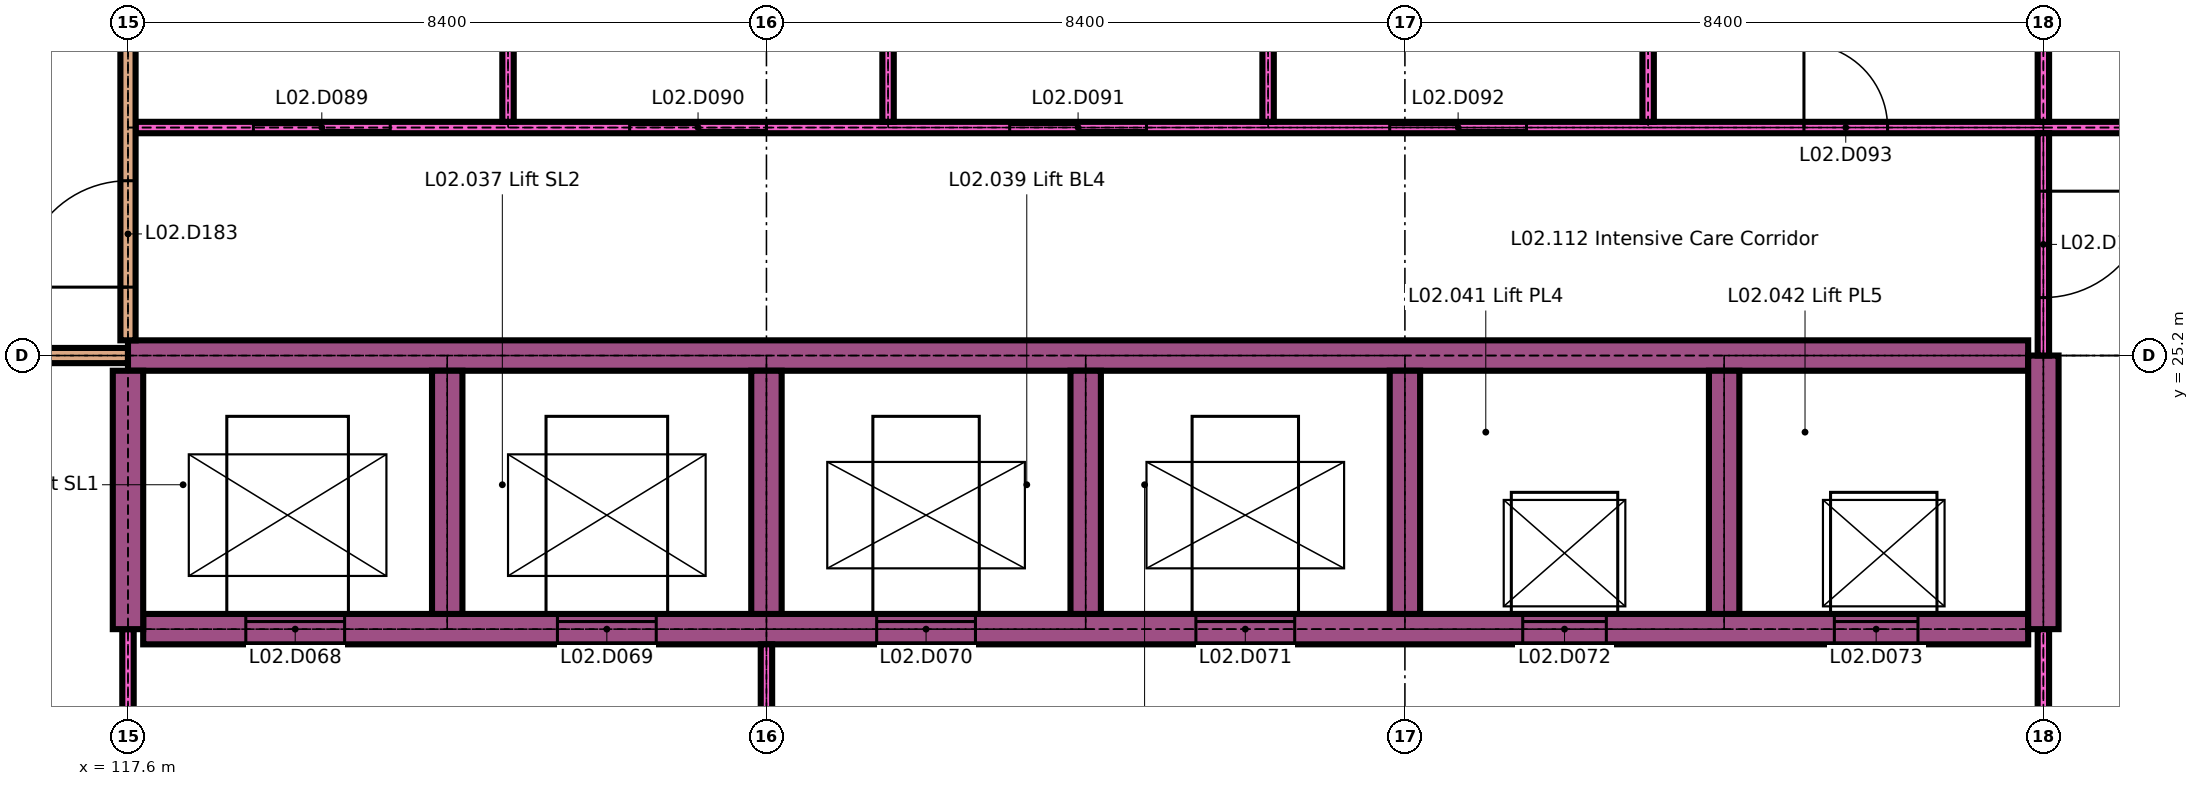
"""IFC4 building model, lengths in metres.
Left out: names, types, materials, properties, quantities, classifications, styles, units other than length and angle.
Written with IfcOpenShell. Run it as: python <this file> out.ifc"""

import sys

from ifc_helpers import new_model, si_unit, direction, frame, frame_2d, origin, place, context, subcontext, project, spatial, rectangle, extrude, element, fill, save


model = new_model("IFC4")
c1 = context("Model", 3, precision=1e-05, world=origin(), true_north=direction((0.0, 1.0)))
c2 = subcontext(c1, "Body", "Model", "MODEL_VIEW")
j1 = project(units=[si_unit("LENGTHUNIT", "METRE"), si_unit("PLANEANGLEUNIT", "RADIAN")], contexts=[c1])
p1 = place(None, origin())
s1 = spatial("IfcSite", under=j1, at=p1, CompositionType="ELEMENT")
p2 = place(p1, origin())
s2 = spatial("IfcBuilding", under=s1, at=p2, CompositionType="ELEMENT")
p3 = place(p2, frame((0.0, 0.0, 8.4)))
s3 = spatial("IfcBuildingStorey", under=s2, at=p3, CompositionType="ELEMENT", Elevation=8.4)
p4 = place(p3, frame((117.8, 21.6, 0.0), z_axis=(0.0, 0.0, 1.0), x_axis=(1.0, 0.0, 0.0)))
e1 = element("IfcWall", 1, at=p4, inside=s3, PredefinedType="SHEAR", context=c2, shape_type="SweptSolid", body=[
    extrude(rectangle(XDim=24.8, YDim=0.4, at=frame_2d((12.4, 0.0))), origin(), (0.0, 0.0, 1.0), 4.2),
])
p5 = place(p4, frame((1.35, 0.0, 0.0)))
e2 = element("IfcOpeningElement", 2, at=p5, cuts=e1, PredefinedType="OPENING", context=c2, shape_type="SweptSolid", body=[
    extrude(rectangle(XDim=1.3, YDim=2.1, at=frame_2d((0.65, 1.05))), frame((0.0, 0.21, 0.0), z_axis=(0.0, -1.0, 0.0), x_axis=(1.0, 0.0, 0.0)), (0.0, 0.0, 1.0), 0.42),
])
p6 = place(p4, frame((5.45, 0.0, 0.0)))
e3 = element("IfcOpeningElement", 3, at=p6, cuts=e1, PredefinedType="OPENING", context=c2, shape_type="SweptSolid", body=[
    extrude(rectangle(XDim=1.3, YDim=2.1, at=frame_2d((0.65, 1.05))), frame((0.0, 0.21, 0.0), z_axis=(0.0, -1.0, 0.0), x_axis=(1.0, 0.0, 0.0)), (0.0, 0.0, 1.0), 0.42),
])
p7 = place(p4, frame((9.65, 0.0, 0.0)))
e4 = element("IfcOpeningElement", 4, at=p7, cuts=e1, PredefinedType="OPENING", context=c2, shape_type="SweptSolid", body=[
    extrude(rectangle(XDim=1.3, YDim=2.1, at=frame_2d((0.65, 1.05))), frame((0.0, 0.21, 0.0), z_axis=(0.0, -1.0, 0.0), x_axis=(1.0, 0.0, 0.0)), (0.0, 0.0, 1.0), 0.42),
])
p8 = place(p4, frame((13.85, 0.0, 0.0)))
e5 = element("IfcOpeningElement", 5, at=p8, cuts=e1, PredefinedType="OPENING", context=c2, shape_type="SweptSolid", body=[
    extrude(rectangle(XDim=1.3, YDim=2.1, at=frame_2d((0.65, 1.05))), frame((0.0, 0.21, 0.0), z_axis=(0.0, -1.0, 0.0), x_axis=(1.0, 0.0, 0.0)), (0.0, 0.0, 1.0), 0.42),
])
p9 = place(p4, frame((18.15, 0.0, 0.0)))
e6 = element("IfcOpeningElement", 6, at=p9, cuts=e1, PredefinedType="OPENING", context=c2, shape_type="SweptSolid", body=[
    extrude(rectangle(XDim=1.1, YDim=2.1, at=frame_2d((0.55, 1.05))), frame((0.0, 0.21, 0.0), z_axis=(0.0, -1.0, 0.0), x_axis=(1.0, 0.0, 0.0)), (0.0, 0.0, 1.0), 0.42),
])
p10 = place(p4, frame((22.25, 0.0, 0.0)))
e7 = element("IfcOpeningElement", 7, at=p10, cuts=e1, PredefinedType="OPENING", context=c2, shape_type="SweptSolid", body=[
    extrude(rectangle(XDim=1.1, YDim=2.1, at=frame_2d((0.55, 1.05))), frame((0.0, 0.21, 0.0), z_axis=(0.0, -1.0, 0.0), x_axis=(1.0, 0.0, 0.0)), (0.0, 0.0, 1.0), 0.42),
])
p11 = place(p3, frame((109.2, 25.2, 0.0), z_axis=(0.0, 0.0, 1.0), x_axis=(1.0, 0.0, 0.0)))
e8 = element("IfcWall", 8, at=p11, inside=s3, PredefinedType="PARTITIONING", context=c2, shape_type="SweptSolid", body=[
    extrude(rectangle(XDim=8.4, YDim=0.2, at=frame_2d((4.2, 0.0))), origin(), (0.0, 0.0, 1.0), 4.2),
])
p12 = place(p11, frame((3.5, 0.0, 0.0)))
e9 = element("IfcOpeningElement", 9, at=p12, cuts=e8, PredefinedType="OPENING", context=c2, shape_type="SweptSolid", body=[
    extrude(rectangle(XDim=1.4, YDim=2.1, at=frame_2d((0.7, 1.05))), frame((0.0, 0.11, 0.0), z_axis=(0.0, -1.0, 0.0), x_axis=(1.0, 0.0, 0.0)), (0.0, 0.0, 1.0), 0.22),
])
p13 = place(p3, frame((117.6, 25.2, 0.0), z_axis=(0.0, 0.0, 1.0), x_axis=(1.0, 0.0, 0.0)))
e10 = element("IfcWall", 10, at=p13, inside=s3, PredefinedType="SHEAR", context=c2, shape_type="SweptSolid", body=[
    extrude(rectangle(XDim=25.0, YDim=0.4, at=frame_2d((12.5, 0.0))), origin(), (0.0, 0.0, 1.0), 4.2),
])
p14 = place(p3, frame((117.7, 28.2, 0.0), z_axis=(0.0, 0.0, 1.0), x_axis=(1.0, 0.0, 0.0)))
e11 = element("IfcWall", 11, at=p14, inside=s3, PredefinedType="PARTITIONING", context=c2, shape_type="SweptSolid", body=[
    extrude(rectangle(XDim=50.15, YDim=0.15, at=frame_2d((25.075, 0.0))), origin(), (0.0, 0.0, 1.0), 4.2),
])
p15 = place(p14, frame((1.55, 0.0, 0.0)))
e12 = element("IfcOpeningElement", 12, at=p15, cuts=e11, PredefinedType="OPENING", context=c2, shape_type="SweptSolid", body=[
    extrude(rectangle(XDim=1.8, YDim=2.4, at=frame_2d((0.9, 1.2))), frame((0.0, 0.085, 0.0), z_axis=(0.0, -1.0, 0.0), x_axis=(1.0, 0.0, 0.0)), (0.0, 0.0, 1.0), 0.17),
])
p16 = place(p14, frame((6.5, 0.0, 0.0)))
e13 = element("IfcOpeningElement", 13, at=p16, cuts=e11, PredefinedType="OPENING", context=c2, shape_type="SweptSolid", body=[
    extrude(rectangle(XDim=1.8, YDim=2.4, at=frame_2d((0.9, 1.2))), frame((0.0, 0.085, 0.0), z_axis=(0.0, -1.0, 0.0), x_axis=(1.0, 0.0, 0.0)), (0.0, 0.0, 1.0), 0.17),
])
p17 = place(p14, frame((11.5, 0.0, 0.0)))
e14 = element("IfcOpeningElement", 14, at=p17, cuts=e11, PredefinedType="OPENING", context=c2, shape_type="SweptSolid", body=[
    extrude(rectangle(XDim=1.8, YDim=2.4, at=frame_2d((0.9, 1.2))), frame((0.0, 0.085, 0.0), z_axis=(0.0, -1.0, 0.0), x_axis=(1.0, 0.0, 0.0)), (0.0, 0.0, 1.0), 0.17),
])
p18 = place(p14, frame((16.5, 0.0, 0.0)))
e15 = element("IfcOpeningElement", 15, at=p18, cuts=e11, PredefinedType="OPENING", context=c2, shape_type="SweptSolid", body=[
    extrude(rectangle(XDim=1.8, YDim=2.4, at=frame_2d((0.9, 1.2))), frame((0.0, 0.085, 0.0), z_axis=(0.0, -1.0, 0.0), x_axis=(1.0, 0.0, 0.0)), (0.0, 0.0, 1.0), 0.17),
])
p19 = place(p14, frame((21.95, 0.0, 0.0)))
e16 = element("IfcOpeningElement", 16, at=p19, cuts=e11, PredefinedType="OPENING", context=c2, shape_type="SweptSolid", body=[
    extrude(rectangle(XDim=1.1, YDim=2.1, at=frame_2d((0.55, 1.05))), frame((0.0, 0.085, 0.0), z_axis=(0.0, -1.0, 0.0), x_axis=(1.0, 0.0, 0.0)), (0.0, 0.0, 1.0), 0.17),
])
p20 = place(p14, frame((26.7, 0.0, 0.0)))
e17 = element("IfcOpeningElement", 17, at=p20, cuts=e11, PredefinedType="OPENING", context=c2, shape_type="SweptSolid", body=[
    extrude(rectangle(XDim=1.8, YDim=2.4, at=frame_2d((0.9, 1.2))), frame((0.0, 0.085, 0.0), z_axis=(0.0, -1.0, 0.0), x_axis=(1.0, 0.0, 0.0)), (0.0, 0.0, 1.0), 0.17),
])
p21 = place(p14, frame((31.7, 0.0, 0.0)))
e18 = element("IfcOpeningElement", 18, at=p21, cuts=e11, PredefinedType="OPENING", context=c2, shape_type="SweptSolid", body=[
    extrude(rectangle(XDim=1.8, YDim=2.4, at=frame_2d((0.9, 1.2))), frame((0.0, 0.085, 0.0), z_axis=(0.0, -1.0, 0.0), x_axis=(1.0, 0.0, 0.0)), (0.0, 0.0, 1.0), 0.17),
])
p22 = place(p14, frame((36.7, 0.0, 0.0)))
e19 = element("IfcOpeningElement", 19, at=p22, cuts=e11, PredefinedType="OPENING", context=c2, shape_type="SweptSolid", body=[
    extrude(rectangle(XDim=1.8, YDim=2.4, at=frame_2d((0.9, 1.2))), frame((0.0, 0.085, 0.0), z_axis=(0.0, -1.0, 0.0), x_axis=(1.0, 0.0, 0.0)), (0.0, 0.0, 1.0), 0.17),
])
p23 = place(p14, frame((41.7, 0.0, 0.0)))
e20 = element("IfcOpeningElement", 20, at=p23, cuts=e11, PredefinedType="OPENING", context=c2, shape_type="SweptSolid", body=[
    extrude(rectangle(XDim=1.8, YDim=2.4, at=frame_2d((0.9, 1.2))), frame((0.0, 0.085, 0.0), z_axis=(0.0, -1.0, 0.0), x_axis=(1.0, 0.0, 0.0)), (0.0, 0.0, 1.0), 0.17),
])
p24 = place(p14, frame((46.725, 0.0, 0.0)))
e21 = element("IfcOpeningElement", 21, at=p24, cuts=e11, PredefinedType="OPENING", context=c2, shape_type="SweptSolid", body=[
    extrude(rectangle(XDim=1.8, YDim=2.4, at=frame_2d((0.9, 1.2))), frame((0.0, 0.085, 0.0), z_axis=(0.0, -1.0, 0.0), x_axis=(1.0, 0.0, 0.0)), (0.0, 0.0, 1.0), 0.17),
])
p25 = place(p3, frame((117.6, 16.8, 0.0), z_axis=(0.0, 0.0, 1.0), x_axis=(0.0, 1.0, 0.0)))
e22 = element("IfcWall", 22, at=p25, inside=s3, PredefinedType="PARTITIONING", context=c2, shape_type="SweptSolid", body=[
    extrude(rectangle(XDim=4.8, YDim=0.15, at=frame_2d((2.4, 0.0))), origin(), (0.0, 0.0, 1.0), 4.2),
])
p26 = place(p3, frame((117.6, 21.6, 0.0), z_axis=(0.0, 0.0, 1.0), x_axis=(0.0, 1.0, 0.0)))
e23 = element("IfcWall", 23, at=p26, inside=s3, PredefinedType="SHEAR", context=c2, shape_type="SweptSolid", body=[
    extrude(rectangle(XDim=3.4, YDim=0.4, at=frame_2d((1.7, 0.0))), origin(), (0.0, 0.0, 1.0), 4.2),
])
p27 = place(p3, frame((117.6, 25.4, 0.0), z_axis=(0.0, 0.0, 1.0), x_axis=(0.0, 1.0, 0.0)))
e24 = element("IfcWall", 24, at=p27, inside=s3, PredefinedType="PARTITIONING", context=c2, shape_type="SweptSolid", body=[
    extrude(rectangle(XDim=4.6, YDim=0.2, at=frame_2d((2.3, 0.0))), origin(), (0.0, 0.0, 1.0), 4.2),
])
p28 = place(p27, frame((0.7, 0.0, 0.0)))
e25 = element("IfcOpeningElement", 25, at=p28, cuts=e24, PredefinedType="OPENING", context=c2, shape_type="SweptSolid", body=[
    extrude(rectangle(XDim=1.4, YDim=2.1, at=frame_2d((0.7, 1.05))), frame((0.0, 0.11, 0.0), z_axis=(0.0, -1.0, 0.0), x_axis=(1.0, 0.0, 0.0)), (0.0, 0.0, 1.0), 0.22),
])
p29 = place(p3, frame((121.8, 21.8, 0.0), z_axis=(0.0, 0.0, 1.0), x_axis=(0.0, 1.0, 0.0)))
e26 = element("IfcWall", 26, at=p29, inside=s3, PredefinedType="SHEAR", context=c2, shape_type="SweptSolid", body=[
    extrude(rectangle(XDim=3.2, YDim=0.4, at=frame_2d((1.6, 0.0))), origin(), (0.0, 0.0, 1.0), 4.2),
])
p30 = place(p3, frame((122.6, 28.275, 0.0), z_axis=(0.0, 0.0, 1.0), x_axis=(0.0, 1.0, 0.0)))
e27 = element("IfcWall", 27, at=p30, inside=s3, PredefinedType="PARTITIONING", context=c2, shape_type="SweptSolid", body=[
    extrude(rectangle(XDim=5.175, YDim=0.15, at=frame_2d((2.587, 0.0))), origin(), (0.0, 0.0, 1.0), 4.2),
])
p31 = place(p3, frame((126.0, 16.8, 0.0), z_axis=(0.0, 0.0, 1.0), x_axis=(0.0, 1.0, 0.0)))
e28 = element("IfcWall", 28, at=p31, inside=s3, PredefinedType="PARTITIONING", context=c2, shape_type="SweptSolid", body=[
    extrude(rectangle(XDim=4.6, YDim=0.15, at=frame_2d((2.3, 0.0))), origin(), (0.0, 0.0, 1.0), 4.2),
])
p32 = place(p3, frame((126.0, 21.8, 0.0), z_axis=(0.0, 0.0, 1.0), x_axis=(0.0, 1.0, 0.0)))
e29 = element("IfcWall", 29, at=p32, inside=s3, PredefinedType="SHEAR", context=c2, shape_type="SweptSolid", body=[
    extrude(rectangle(XDim=3.2, YDim=0.4, at=frame_2d((1.6, 0.0))), origin(), (0.0, 0.0, 1.0), 4.2),
])
p33 = place(p3, frame((127.6, 28.275, 0.0), z_axis=(0.0, 0.0, 1.0), x_axis=(0.0, 1.0, 0.0)))
e30 = element("IfcWall", 30, at=p33, inside=s3, PredefinedType="PARTITIONING", context=c2, shape_type="SweptSolid", body=[
    extrude(rectangle(XDim=5.175, YDim=0.15, at=frame_2d((2.587, 0.0))), origin(), (0.0, 0.0, 1.0), 4.2),
])
p34 = place(p3, frame((130.2, 21.8, 0.0), z_axis=(0.0, 0.0, 1.0), x_axis=(0.0, 1.0, 0.0)))
e31 = element("IfcWall", 31, at=p34, inside=s3, PredefinedType="SHEAR", context=c2, shape_type="SweptSolid", body=[
    extrude(rectangle(XDim=3.2, YDim=0.4, at=frame_2d((1.6, 0.0))), origin(), (0.0, 0.0, 1.0), 4.2),
])
p35 = place(p3, frame((132.6, 28.275, 0.0), z_axis=(0.0, 0.0, 1.0), x_axis=(0.0, 1.0, 0.0)))
e32 = element("IfcWall", 32, at=p35, inside=s3, PredefinedType="PARTITIONING", context=c2, shape_type="SweptSolid", body=[
    extrude(rectangle(XDim=5.175, YDim=0.15, at=frame_2d((2.587, 0.0))), origin(), (0.0, 0.0, 1.0), 4.2),
])
p36 = place(p3, frame((134.4, 21.8, 0.0), z_axis=(0.0, 0.0, 1.0), x_axis=(0.0, 1.0, 0.0)))
e33 = element("IfcWall", 33, at=p36, inside=s3, PredefinedType="SHEAR", context=c2, shape_type="SweptSolid", body=[
    extrude(rectangle(XDim=3.2, YDim=0.4, at=frame_2d((1.6, 0.0))), origin(), (0.0, 0.0, 1.0), 4.2),
])
p37 = place(p3, frame((137.6, 28.275, 0.0), z_axis=(0.0, 0.0, 1.0), x_axis=(0.0, 1.0, 0.0)))
e34 = element("IfcWall", 34, at=p37, inside=s3, PredefinedType="PARTITIONING", context=c2, shape_type="SweptSolid", body=[
    extrude(rectangle(XDim=5.175, YDim=0.15, at=frame_2d((2.587, 0.0))), origin(), (0.0, 0.0, 1.0), 4.2),
])
p38 = place(p3, frame((138.6, 21.8, 0.0), z_axis=(0.0, 0.0, 1.0), x_axis=(0.0, 1.0, 0.0)))
e35 = element("IfcWall", 35, at=p38, inside=s3, PredefinedType="SHEAR", context=c2, shape_type="SweptSolid", body=[
    extrude(rectangle(XDim=3.2, YDim=0.4, at=frame_2d((1.6, 0.0))), origin(), (0.0, 0.0, 1.0), 4.2),
])
p39 = place(p3, frame((142.8, 16.875, 0.0), z_axis=(0.0, 0.0, 1.0), x_axis=(0.0, 1.0, 0.0)))
e36 = element("IfcWall", 36, at=p39, inside=s3, PredefinedType="PARTITIONING", context=c2, shape_type="SweptSolid", body=[
    extrude(rectangle(XDim=4.725, YDim=0.15, at=frame_2d((2.363, 0.0))), origin(), (0.0, 0.0, 1.0), 4.2),
])
p40 = place(p3, frame((142.8, 21.6, 0.0), z_axis=(0.0, 0.0, 1.0), x_axis=(0.0, 1.0, 0.0)))
e37 = element("IfcWall", 37, at=p40, inside=s3, PredefinedType="SHEAR", context=c2, shape_type="SweptSolid", body=[
    extrude(rectangle(XDim=3.6, YDim=0.4, at=frame_2d((1.8, 0.0))), origin(), (0.0, 0.0, 1.0), 4.2),
])
p41 = place(p3, frame((142.8, 25.2, 0.0), z_axis=(0.0, 0.0, 1.0), x_axis=(0.0, 1.0, 0.0)))
e38 = element("IfcWall", 38, at=p41, inside=s3, PredefinedType="PARTITIONING", context=c2, shape_type="SweptSolid", body=[
    extrude(rectangle(XDim=2.925, YDim=0.15, at=frame_2d((1.462, 0.0))), origin(), (0.0, 0.0, 1.0), 4.2),
])
p42 = place(p41, frame((0.762, 0.0, 0.0)))
e39 = element("IfcOpeningElement", 39, at=p42, cuts=e38, PredefinedType="OPENING", context=c2, shape_type="SweptSolid", body=[
    extrude(rectangle(XDim=1.4, YDim=2.1, at=frame_2d((0.7, 1.05))), frame((0.0, 0.085, 0.0), z_axis=(0.0, -1.0, 0.0), x_axis=(1.0, 0.0, 0.0)), (0.0, 0.0, 1.0), 0.17),
])
p43 = place(p3, frame((142.8, 28.275, 0.0), z_axis=(0.0, 0.0, 1.0), x_axis=(0.0, 1.0, 0.0)))
e40 = element("IfcWall", 40, at=p43, inside=s3, PredefinedType="PARTITIONING", context=c2, shape_type="SweptSolid", body=[
    extrude(rectangle(XDim=4.9, YDim=0.15, at=frame_2d((2.45, 0.0))), origin(), (0.0, 0.0, 1.0), 4.2),
])
p44 = place(p5, origin())
e41 = element("IfcDoor", 41, at=p44, inside=s3, OperationType="SLIDING_TO_LEFT", PredefinedType="DOOR", context=c2, shape_type="SweptSolid", body=[
    extrude(rectangle(XDim=1.3, YDim=2.1, at=frame_2d((0.65, 1.05))), frame((0.0, 0.025, 0.0), z_axis=(0.0, -1.0, 0.0), x_axis=(1.0, 0.0, 0.0)), (0.0, 0.0, 1.0), 0.05),
])
fill(e2, e41)
p45 = place(p6, origin())
e42 = element("IfcDoor", 42, at=p45, inside=s3, OperationType="SLIDING_TO_LEFT", PredefinedType="DOOR", context=c2, shape_type="SweptSolid", body=[
    extrude(rectangle(XDim=1.3, YDim=2.1, at=frame_2d((0.65, 1.05))), frame((0.0, 0.025, 0.0), z_axis=(0.0, -1.0, 0.0), x_axis=(1.0, 0.0, 0.0)), (0.0, 0.0, 1.0), 0.05),
])
fill(e3, e42)
p46 = place(p7, origin())
e43 = element("IfcDoor", 43, at=p46, inside=s3, OperationType="SLIDING_TO_LEFT", PredefinedType="DOOR", context=c2, shape_type="SweptSolid", body=[
    extrude(rectangle(XDim=1.3, YDim=2.1, at=frame_2d((0.65, 1.05))), frame((0.0, 0.025, 0.0), z_axis=(0.0, -1.0, 0.0), x_axis=(1.0, 0.0, 0.0)), (0.0, 0.0, 1.0), 0.05),
])
fill(e4, e43)
p47 = place(p8, origin())
e44 = element("IfcDoor", 44, at=p47, inside=s3, OperationType="SLIDING_TO_LEFT", PredefinedType="DOOR", context=c2, shape_type="SweptSolid", body=[
    extrude(rectangle(XDim=1.3, YDim=2.1, at=frame_2d((0.65, 1.05))), frame((0.0, 0.025, 0.0), z_axis=(0.0, -1.0, 0.0), x_axis=(1.0, 0.0, 0.0)), (0.0, 0.0, 1.0), 0.05),
])
fill(e5, e44)
p48 = place(p9, origin())
e45 = element("IfcDoor", 45, at=p48, inside=s3, OperationType="SLIDING_TO_LEFT", PredefinedType="DOOR", context=c2, shape_type="SweptSolid", body=[
    extrude(rectangle(XDim=1.1, YDim=2.1, at=frame_2d((0.55, 1.05))), frame((0.0, 0.025, 0.0), z_axis=(0.0, -1.0, 0.0), x_axis=(1.0, 0.0, 0.0)), (0.0, 0.0, 1.0), 0.05),
])
fill(e6, e45)
p49 = place(p10, origin())
e46 = element("IfcDoor", 46, at=p49, inside=s3, OperationType="SLIDING_TO_LEFT", PredefinedType="DOOR", context=c2, shape_type="SweptSolid", body=[
    extrude(rectangle(XDim=1.1, YDim=2.1, at=frame_2d((0.55, 1.05))), frame((0.0, 0.025, 0.0), z_axis=(0.0, -1.0, 0.0), x_axis=(1.0, 0.0, 0.0)), (0.0, 0.0, 1.0), 0.05),
])
fill(e7, e46)
p50 = place(p15, origin())
e47 = element("IfcDoor", 47, at=p50, inside=s3, OperationType="DOUBLE_DOOR_SLIDING", PredefinedType="DOOR", context=c2, shape_type="SweptSolid", body=[
    extrude(rectangle(XDim=1.8, YDim=2.4, at=frame_2d((0.9, 1.2))), frame((0.0, 0.035, 0.0), z_axis=(0.0, -1.0, 0.0), x_axis=(1.0, 0.0, 0.0)), (0.0, 0.0, 1.0), 0.07),
])
fill(e12, e47)
p51 = place(p16, origin())
e48 = element("IfcDoor", 48, at=p51, inside=s3, OperationType="DOUBLE_DOOR_SLIDING", PredefinedType="DOOR", context=c2, shape_type="SweptSolid", body=[
    extrude(rectangle(XDim=1.8, YDim=2.4, at=frame_2d((0.9, 1.2))), frame((0.0, 0.035, 0.0), z_axis=(0.0, -1.0, 0.0), x_axis=(1.0, 0.0, 0.0)), (0.0, 0.0, 1.0), 0.07),
])
fill(e13, e48)
p52 = place(p17, origin())
e49 = element("IfcDoor", 49, at=p52, inside=s3, OperationType="DOUBLE_DOOR_SLIDING", PredefinedType="DOOR", context=c2, shape_type="SweptSolid", body=[
    extrude(rectangle(XDim=1.8, YDim=2.4, at=frame_2d((0.9, 1.2))), frame((0.0, 0.035, 0.0), z_axis=(0.0, -1.0, 0.0), x_axis=(1.0, 0.0, 0.0)), (0.0, 0.0, 1.0), 0.07),
])
fill(e14, e49)
p53 = place(p18, origin())
e50 = element("IfcDoor", 50, at=p53, inside=s3, OperationType="DOUBLE_DOOR_SLIDING", PredefinedType="DOOR", context=c2, shape_type="SweptSolid", body=[
    extrude(rectangle(XDim=1.8, YDim=2.4, at=frame_2d((0.9, 1.2))), frame((0.0, 0.035, 0.0), z_axis=(0.0, -1.0, 0.0), x_axis=(1.0, 0.0, 0.0)), (0.0, 0.0, 1.0), 0.07),
])
fill(e15, e50)
p54 = place(p19, origin())
e51 = element("IfcDoor", 51, at=p54, inside=s3, OperationType="SINGLE_SWING_RIGHT", PredefinedType="DOOR", context=c2, shape_type="SweptSolid", body=[
    extrude(rectangle(XDim=1.1, YDim=2.1, at=frame_2d((0.55, 1.05))), frame((0.0, 0.025, 0.0), z_axis=(0.0, -1.0, 0.0), x_axis=(1.0, 0.0, 0.0)), (0.0, 0.0, 1.0), 0.05),
])
fill(e16, e51)
p55 = place(p28, origin())
e52 = element("IfcDoor", 52, at=p55, inside=s3, OperationType="SINGLE_SWING_RIGHT", PredefinedType="DOOR", context=c2, shape_type="SweptSolid", body=[
    extrude(rectangle(XDim=1.4, YDim=2.1, at=frame_2d((0.7, 1.05))), frame((0.0, 0.03, 0.0), z_axis=(0.0, -1.0, 0.0), x_axis=(1.0, 0.0, 0.0)), (0.0, 0.0, 1.0), 0.06),
])
fill(e25, e52)
p56 = place(p42, origin())
e53 = element("IfcDoor", 53, at=p56, inside=s3, OperationType="SINGLE_SWING_RIGHT", PredefinedType="DOOR", context=c2, shape_type="SweptSolid", body=[
    extrude(rectangle(XDim=1.4, YDim=2.1, at=frame_2d((0.7, 1.05))), frame((0.0, 0.025, 0.0), z_axis=(0.0, -1.0, 0.0), x_axis=(1.0, 0.0, 0.0)), (0.0, 0.0, 1.0), 0.05),
])
fill(e39, e53)
save(model, sys.argv[1])
